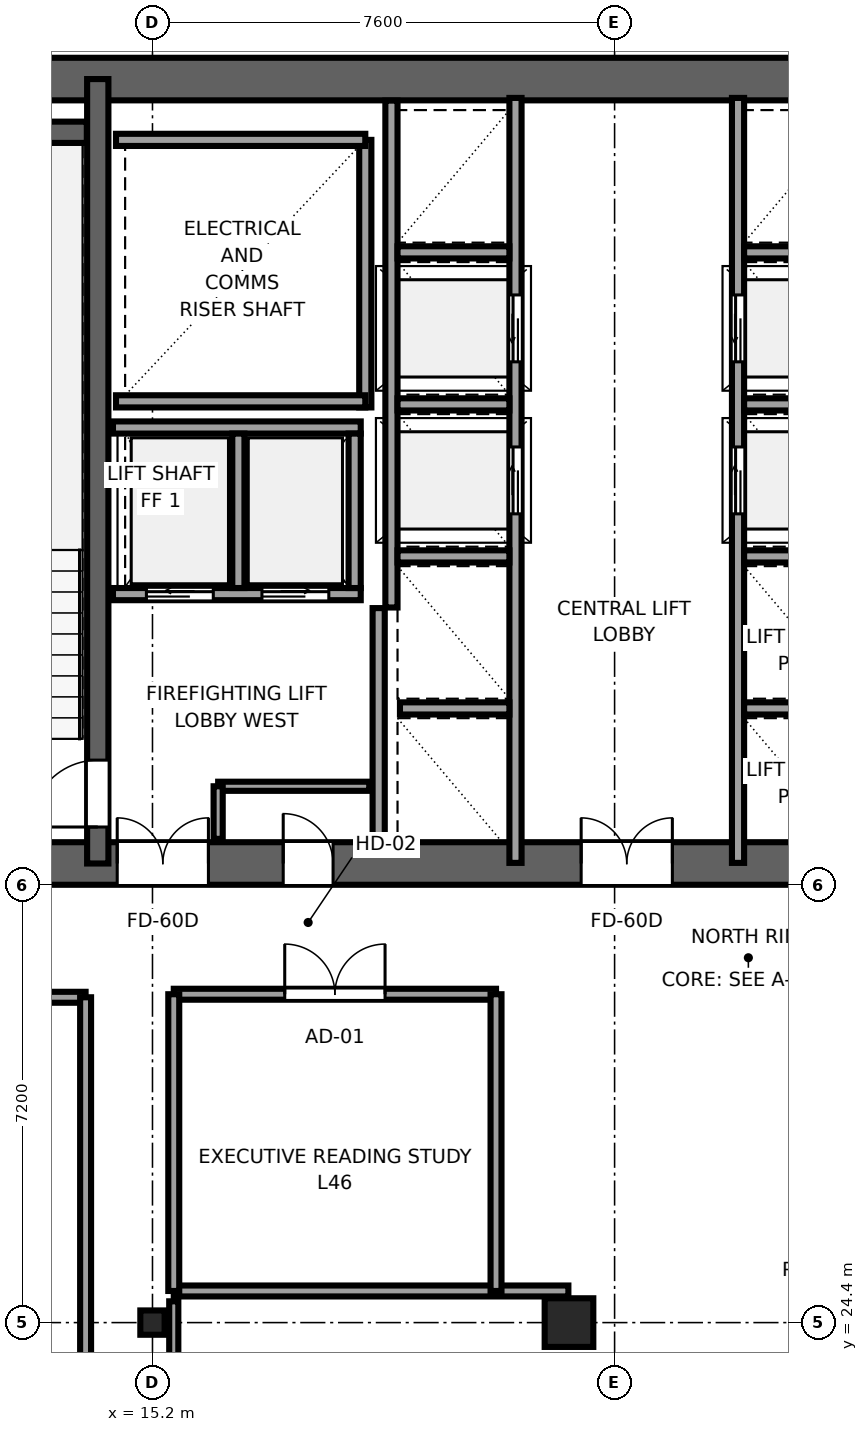
"""IFC4 building model, lengths in metres.
Left out: names, types, materials, properties, quantities, classifications, styles, units other than length and angle.
Written with IfcOpenShell. Run it as: python <this file> out.ifc"""

import sys

from ifc_helpers import new_model, si_unit, direction, frame, frame_2d, origin, origin_2d, place, context, subcontext, project, spatial, rectangle, i_section, extrude, source, transform, mapped, element, fill, save


model = new_model("IFC4")
c1 = context("Model", 3, precision=1e-05, world=origin(), true_north=direction((0.0, 1.0)))
c2 = subcontext(c1, "Body", "Model", "MODEL_VIEW")
j1 = project(units=[si_unit("LENGTHUNIT", "METRE"), si_unit("PLANEANGLEUNIT", "RADIAN")], contexts=[c1])
p1 = place(None, origin())
s1 = spatial("IfcSite", under=j1, at=p1, CompositionType="ELEMENT")
p2 = place(p1, origin())
s2 = spatial("IfcBuilding", under=s1, at=p2, CompositionType="ELEMENT")
p3 = place(p2, frame((0.0, 0.0, 175.45)))
s3 = spatial("IfcBuildingStorey", under=s2, at=p3, CompositionType="ELEMENT", Elevation=175.45)
p4 = place(p3, frame((9.8, 31.95, 0.0), z_axis=(0.0, 0.0, 1.0), x_axis=(1.0, 0.0, 0.0)))
e1 = element("IfcWall", 1, at=p4, inside=s3, PredefinedType="SHEAR", context=c2, shape_type="SweptSolid", body=[
    extrude(rectangle(XDim=26.4, YDim=0.7, at=frame_2d((13.2, 0.0))), origin(), (0.0, 0.0, 1.0), 3.55),
])
p5 = place(p4, frame((6.32, 0.0, 0.0), z_axis=(0.0, 0.0, 1.0), x_axis=(-1.0, 0.0, 0.0)))
e2 = element("IfcOpeningElement", 2, at=p5, cuts=e1, PredefinedType="OPENING", context=c2, shape_type="SweptSolid", body=[
    extrude(rectangle(XDim=1.5, YDim=2.04, at=frame_2d((0.75, 1.02))), frame((0.0, 0.36, 0.0), z_axis=(0.0, -1.0, 0.0), x_axis=(1.0, 0.0, 0.0)), (0.0, 0.0, 1.0), 0.72),
])
p6 = place(p4, frame((13.95, 0.0, 0.0), z_axis=(0.0, 0.0, 1.0), x_axis=(-1.0, 0.0, 0.0)))
e3 = element("IfcOpeningElement", 3, at=p6, cuts=e1, PredefinedType="OPENING", context=c2, shape_type="SweptSolid", body=[
    extrude(rectangle(XDim=1.5, YDim=2.04, at=frame_2d((0.75, 1.02))), frame((0.0, 0.36, 0.0), z_axis=(0.0, -1.0, 0.0), x_axis=(1.0, 0.0, 0.0)), (0.0, 0.0, 1.0), 0.72),
])
p7 = place(p4, frame((20.25, 0.0, 0.0), z_axis=(0.0, 0.0, 1.0), x_axis=(-1.0, 0.0, 0.0)))
e4 = element("IfcOpeningElement", 4, at=p7, cuts=e1, PredefinedType="OPENING", context=c2, shape_type="SweptSolid", body=[
    extrude(rectangle(XDim=1.5, YDim=2.04, at=frame_2d((0.75, 1.02))), frame((0.0, 0.36, 0.0), z_axis=(0.0, -1.0, 0.0), x_axis=(1.0, 0.0, 0.0)), (0.0, 0.0, 1.0), 0.72),
])
p8 = place(p4, frame((8.37, 0.0, 0.0), z_axis=(0.0, 0.0, 1.0), x_axis=(-1.0, 0.0, 0.0)))
e5 = element("IfcOpeningElement", 5, at=p8, cuts=e1, PredefinedType="OPENING", context=c2, shape_type="SweptSolid", body=[
    extrude(rectangle(XDim=0.82, YDim=2.01, at=frame_2d((0.41, 1.005))), frame((0.0, 0.36, 0.0), z_axis=(0.0, -1.0, 0.0), x_axis=(1.0, 0.0, 0.0)), (0.0, 0.0, 1.0), 0.72),
])
p9 = place(p3, frame((9.8, 44.85, 0.0), z_axis=(0.0, 0.0, 1.0), x_axis=(1.0, 0.0, 0.0)))
e6 = element("IfcWall", 6, at=p9, inside=s3, PredefinedType="SHEAR", context=c2, shape_type="SweptSolid", body=[
    extrude(rectangle(XDim=26.4, YDim=0.7, at=frame_2d((13.2, 0.0))), origin(), (0.0, 0.0, 1.0), 3.55),
])
p10 = place(p3, frame((14.3, 31.95, 0.0), z_axis=(0.0, 0.0, 1.0), x_axis=(0.0, 1.0, 0.0)))
e7 = element("IfcWall", 7, at=p10, inside=s3, PredefinedType="SHEAR", context=c2, shape_type="SweptSolid", body=[
    extrude(rectangle(XDim=12.9, YDim=0.35, at=frame_2d((6.45, 0.0))), origin(), (0.0, 0.0, 1.0), 3.55),
])
p11 = place(p10, frame((0.6, 0.0, 0.0)))
e8 = element("IfcOpeningElement", 8, at=p11, cuts=e7, PredefinedType="OPENING", context=c2, shape_type="SweptSolid", body=[
    extrude(rectangle(XDim=1.1, YDim=2.12, at=frame_2d((0.55, 1.06))), frame((0.0, 0.185, 0.0), z_axis=(0.0, -1.0, 0.0), x_axis=(1.0, 0.0, 0.0)), (0.0, 0.0, 1.0), 0.37),
])
p12 = place(p3, frame((10.52, 43.975, 0.0), z_axis=(0.0, 0.0, 1.0), x_axis=(1.0, 0.0, 0.0)))
e9 = element("IfcWall", 9, at=p12, inside=s3, PredefinedType="SHEAR", context=c2, shape_type="SweptSolid", body=[
    extrude(rectangle(XDim=3.6, YDim=0.35, at=frame_2d((1.8, 0.0))), origin(), (0.0, 0.0, 1.0), 3.55),
])
m1 = source(origin(), c2, "Body", "SweptSolid", [
    extrude(i_section(OverallWidth=0.4, OverallDepth=0.4, WebThickness=0.02, FlangeThickness=0.035, at=origin_2d()), origin(), (0.0, 0.0, 1.0), 3.55),
])
p13 = place(p3, frame((15.2, 24.4, 0.0), z_axis=(0.0, 0.0, 1.0), x_axis=(1.0, 0.0, 0.0)))
e10 = element("IfcColumn", 10, at=p13, inside=s3, PredefinedType="COLUMN", context=c2, shape_type="MappedRepresentation", body=[
    mapped(m1, transform((0.0, 0.0, 0.0), x_axis=(1.0, 0.0, 0.0), y_axis=(0.0, 1.0, 0.0), z_axis=(0.0, 0.0, 1.0), scale=1.0)),
])
m2 = source(origin(), c2, "Body", "SweptSolid", [
    extrude(rectangle(XDim=0.8, YDim=0.8, at=origin_2d()), origin(), (0.0, 0.0, 1.0), 3.55),
])
p14 = place(p3, frame((22.05, 24.4, 0.0), z_axis=(0.0, 0.0, 1.0), x_axis=(1.0, 0.0, 0.0)))
e11 = element("IfcColumn", 11, at=p14, inside=s3, PredefinedType="COLUMN", context=c2, shape_type="MappedRepresentation", body=[
    mapped(m2, transform((0.0, 0.0, 0.0), x_axis=(1.0, 0.0, 0.0), y_axis=(0.0, 1.0, 0.0), z_axis=(0.0, 0.0, 1.0), scale=1.0)),
])
p15 = place(p3, frame((18.7, 39.45, 0.0), z_axis=(0.0, 0.0, 1.0), x_axis=(0.0, 1.0, 0.0)))
e12 = element("IfcWall", 12, at=p15, inside=s3, PredefinedType="SOLIDWALL", context=c2, shape_type="SweptSolid", body=[
    extrude(rectangle(XDim=4.4, YDim=0.2, at=frame_2d((2.2, 0.0))), origin(), (0.0, 0.0, 1.0), 3.37),
])
for number, where, z_axis, x_axis in (
    (13, (14.6, 39.55, 0.0), (0.0, 0.0, 1.0), (1.0, 0.0, 0.0)),
    (14, (14.6, 43.85, 0.0), (0.0, 0.0, 1.0), (1.0, 0.0, 0.0)),
):
    element("IfcWall", number, at=place(p3, frame(where, z_axis=z_axis, x_axis=x_axis)), inside=s3, PredefinedType="SOLIDWALL", context=c2, shape_type="SweptSolid", body=[
        extrude(rectangle(XDim=4.1, YDim=0.2, at=frame_2d((2.05, 0.0))), origin(), (0.0, 0.0, 1.0), 3.37),
    ])
p16 = place(p3, frame((18.92, 32.304, 0.0), z_axis=(0.0, 0.0, 1.0), x_axis=(0.0, 1.0, 0.0)))
e15 = element("IfcWall", 15, at=p16, inside=s3, PredefinedType="SOLIDWALL", context=c2, shape_type="SweptSolid", body=[
    extrude(rectangle(XDim=3.846, YDim=0.2, at=frame_2d((1.923, 0.0))), origin(), (0.0, 0.0, 1.0), 3.37),
])
p17 = place(p3, frame((21.17, 31.96, 0.0), z_axis=(0.0, 0.0, 1.0), x_axis=(0.0, 1.0, 0.0)))
e16 = element("IfcWall", 16, at=p17, inside=s3, PredefinedType="SOLIDWALL", context=c2, shape_type="SweptSolid", body=[
    extrude(rectangle(XDim=12.58, YDim=0.2, at=frame_2d((6.29, 0.0))), origin(), (0.0, 0.0, 1.0), 3.37),
])
p18 = place(p17, frame((5.74, 0.0, 0.0)))
e17 = element("IfcOpeningElement", 17, at=p18, cuts=e16, PredefinedType="OPENING", context=c2, shape_type="SweptSolid", body=[
    extrude(rectangle(XDim=1.1, YDim=2.12, at=frame_2d((0.55, 1.06))), frame((0.0, 0.11, 0.0), z_axis=(0.0, -1.0, 0.0), x_axis=(1.0, 0.0, 0.0)), (0.0, 0.0, 1.0), 0.22),
])
p19 = place(p17, frame((8.24, 0.0, 0.0)))
e18 = element("IfcOpeningElement", 18, at=p19, cuts=e16, PredefinedType="OPENING", context=c2, shape_type="SweptSolid", body=[
    extrude(rectangle(XDim=1.1, YDim=2.12, at=frame_2d((0.55, 1.06))), frame((0.0, 0.11, 0.0), z_axis=(0.0, -1.0, 0.0), x_axis=(1.0, 0.0, 0.0)), (0.0, 0.0, 1.0), 0.22),
])
p20 = place(p3, frame((19.13, 36.16, 0.0), z_axis=(0.0, 0.0, 1.0), x_axis=(0.0, 1.0, 0.0)))
e19 = element("IfcWall", 19, at=p20, inside=s3, PredefinedType="SOLIDWALL", context=c2, shape_type="SweptSolid", body=[
    extrude(rectangle(XDim=8.336, YDim=0.2, at=frame_2d((4.168, 0.0))), origin(), (0.0, 0.0, 1.0), 3.37),
])
p21 = place(p3, frame((19.27, 34.5, 0.0), z_axis=(0.0, 0.0, 1.0), x_axis=(1.0, 0.0, 0.0)))
e20 = element("IfcWall", 20, at=p21, inside=s3, PredefinedType="SOLIDWALL", context=c2, shape_type="SweptSolid", body=[
    extrude(rectangle(XDim=1.8, YDim=0.2, at=frame_2d((0.9, 0.0))), origin(), (0.0, 0.0, 1.0), 3.37),
])
for number, where, z_axis, x_axis in (
    (21, (19.23, 37.0, 0.0), (0.0, 0.0, 1.0), (1.0, 0.0, 0.0)),
    (22, (19.23, 39.5, 0.0), (0.0, 0.0, 1.0), (1.0, 0.0, 0.0)),
    (23, (19.23, 42.0, 0.0), (0.0, 0.0, 1.0), (1.0, 0.0, 0.0)),
):
    element("IfcWall", number, at=place(p3, frame(where, z_axis=z_axis, x_axis=x_axis)), inside=s3, PredefinedType="SOLIDWALL", context=c2, shape_type="SweptSolid", body=[
        extrude(rectangle(XDim=1.84, YDim=0.2, at=frame_2d((0.92, 0.0))), origin(), (0.0, 0.0, 1.0), 3.37),
    ])
p22 = place(p3, frame((14.55, 36.38, 0.0), z_axis=(0.0, 0.0, 1.0), x_axis=(1.0, 0.0, 0.0)))
e24 = element("IfcWall", 24, at=p22, inside=s3, PredefinedType="SOLIDWALL", context=c2, shape_type="SweptSolid", body=[
    extrude(rectangle(XDim=4.075, YDim=0.2, at=frame_2d((2.038, 0.0))), origin(), (0.0, 0.0, 1.0), 3.37),
])
p23 = place(p22, frame((0.55, 0.0, 0.0)))
e25 = element("IfcOpeningElement", 25, at=p23, cuts=e24, PredefinedType="OPENING", context=c2, shape_type="SweptSolid", body=[
    extrude(rectangle(XDim=1.1, YDim=2.12, at=frame_2d((0.55, 1.06))), frame((0.0, 0.11, 0.0), z_axis=(0.0, -1.0, 0.0), x_axis=(1.0, 0.0, 0.0)), (0.0, 0.0, 1.0), 0.22),
])
p24 = place(p22, frame((2.45, 0.0, 0.0)))
e26 = element("IfcOpeningElement", 26, at=p24, cuts=e24, PredefinedType="OPENING", context=c2, shape_type="SweptSolid", body=[
    extrude(rectangle(XDim=1.1, YDim=2.12, at=frame_2d((0.55, 1.06))), frame((0.0, 0.11, 0.0), z_axis=(0.0, -1.0, 0.0), x_axis=(1.0, 0.0, 0.0)), (0.0, 0.0, 1.0), 0.22),
])
p25 = place(p3, frame((14.55, 39.12, 0.0), z_axis=(0.0, 0.0, 1.0), x_axis=(1.0, 0.0, 0.0)))
e27 = element("IfcWall", 27, at=p25, inside=s3, PredefinedType="SOLIDWALL", context=c2, shape_type="SweptSolid", body=[
    extrude(rectangle(XDim=4.075, YDim=0.2, at=frame_2d((2.038, 0.0))), origin(), (0.0, 0.0, 1.0), 3.37),
])
for number, where, z_axis, x_axis in (
    (28, (18.525, 36.48, 0.0), (0.0, 0.0, 1.0), (0.0, 1.0, 0.0)),
    (29, (16.613, 36.48, 0.0), (0.0, 0.0, 1.0), (0.0, 1.0, 0.0)),
):
    element("IfcWall", number, at=place(p3, frame(where, z_axis=z_axis, x_axis=x_axis)), inside=s3, PredefinedType="SOLIDWALL", context=c2, shape_type="SweptSolid", body=[
        extrude(rectangle(XDim=2.54, YDim=0.2, at=frame_2d((1.27, 0.0))), origin(), (0.0, 0.0, 1.0), 3.37),
    ])
p26 = place(p3, frame((24.83, 31.96, 0.0), z_axis=(0.0, 0.0, 1.0), x_axis=(0.0, 1.0, 0.0)))
e30 = element("IfcWall", 30, at=p26, inside=s3, PredefinedType="SOLIDWALL", context=c2, shape_type="SweptSolid", body=[
    extrude(rectangle(XDim=12.58, YDim=0.2, at=frame_2d((6.29, 0.0))), origin(), (0.0, 0.0, 1.0), 3.37),
])
p27 = place(p26, frame((5.74, 0.0, 0.0)))
e31 = element("IfcOpeningElement", 31, at=p27, cuts=e30, PredefinedType="OPENING", context=c2, shape_type="SweptSolid", body=[
    extrude(rectangle(XDim=1.1, YDim=2.12, at=frame_2d((0.55, 1.06))), frame((0.0, 0.11, 0.0), z_axis=(0.0, -1.0, 0.0), x_axis=(1.0, 0.0, 0.0)), (0.0, 0.0, 1.0), 0.22),
])
p28 = place(p26, frame((8.24, 0.0, 0.0)))
e32 = element("IfcOpeningElement", 32, at=p28, cuts=e30, PredefinedType="OPENING", context=c2, shape_type="SweptSolid", body=[
    extrude(rectangle(XDim=1.1, YDim=2.12, at=frame_2d((0.55, 1.06))), frame((0.0, 0.11, 0.0), z_axis=(0.0, -1.0, 0.0), x_axis=(1.0, 0.0, 0.0)), (0.0, 0.0, 1.0), 0.22),
])
p29 = place(p3, frame((24.93, 34.5, 0.0), z_axis=(0.0, 0.0, 1.0), x_axis=(1.0, 0.0, 0.0)))
e33 = element("IfcWall", 33, at=p29, inside=s3, PredefinedType="SOLIDWALL", context=c2, shape_type="SweptSolid", body=[
    extrude(rectangle(XDim=1.8, YDim=0.2, at=frame_2d((0.9, 0.0))), origin(), (0.0, 0.0, 1.0), 3.37),
])
for number, where, z_axis, x_axis in (
    (34, (24.93, 37.0, 0.0), (0.0, 0.0, 1.0), (1.0, 0.0, 0.0)),
    (35, (24.93, 39.5, 0.0), (0.0, 0.0, 1.0), (1.0, 0.0, 0.0)),
    (36, (24.93, 42.0, 0.0), (0.0, 0.0, 1.0), (1.0, 0.0, 0.0)),
):
    element("IfcWall", number, at=place(p3, frame(where, z_axis=z_axis, x_axis=x_axis)), inside=s3, PredefinedType="SOLIDWALL", context=c2, shape_type="SweptSolid", body=[
        extrude(rectangle(XDim=1.84, YDim=0.2, at=frame_2d((0.92, 0.0))), origin(), (0.0, 0.0, 1.0), 3.37),
    ])
p30 = place(p3, frame((16.28, 33.22, 0.0), z_axis=(0.0, 0.0, 1.0), x_axis=(1.0, 0.0, 0.0)))
e37 = element("IfcWall", 37, at=p30, inside=s3, PredefinedType="PARTITIONING", context=c2, shape_type="SweptSolid", body=[
    extrude(rectangle(XDim=2.485, YDim=0.15, at=frame_2d((1.242, 0.0))), origin(), (0.0, 0.0, 1.0), 3.37),
])
p31 = place(p3, frame((16.28, 32.355, 0.0), z_axis=(0.0, 0.0, 1.0), x_axis=(0.0, 1.0, 0.0)))
e38 = element("IfcWall", 38, at=p31, inside=s3, PredefinedType="PARTITIONING", context=c2, shape_type="SweptSolid", body=[
    extrude(rectangle(XDim=0.865, YDim=0.15, at=frame_2d((0.433, 0.0))), origin(), (0.0, 0.0, 1.0), 3.37),
])
p32 = place(p3, frame((9.88, 29.75, 0.0), z_axis=(0.0, 0.0, 1.0), x_axis=(1.0, 0.0, 0.0)))
e39 = element("IfcWall", 39, at=p32, inside=s3, PredefinedType="PARTITIONING", context=c2, shape_type="SweptSolid", body=[
    extrude(rectangle(XDim=4.22, YDim=0.18, at=frame_2d((2.11, 0.0))), origin(), (0.0, 0.0, 1.0), 3.37),
])
p33 = place(p3, frame((14.1, 20.7, 0.0), z_axis=(0.0, 0.0, 1.0), x_axis=(0.0, 1.0, 0.0)))
e40 = element("IfcWall", 40, at=p33, inside=s3, PredefinedType="PARTITIONING", context=c2, shape_type="SweptSolid", body=[
    extrude(rectangle(XDim=9.05, YDim=0.18, at=frame_2d((4.525, 0.0))), origin(), (0.0, 0.0, 1.0), 3.37),
])
p34 = place(p3, frame((15.55, 24.92, 0.0), z_axis=(0.0, 0.0, 1.0), x_axis=(1.0, 0.0, 0.0)))
e41 = element("IfcWall", 41, at=p34, inside=s3, PredefinedType="PARTITIONING", context=c2, shape_type="SweptSolid", body=[
    extrude(rectangle(XDim=6.49, YDim=0.18, at=frame_2d((3.245, 0.0))), origin(), (0.0, 0.0, 1.0), 3.37),
])
p35 = place(p3, frame((15.55, 29.8, 0.0), z_axis=(0.0, 0.0, 1.0), x_axis=(1.0, 0.0, 0.0)))
e42 = element("IfcWall", 42, at=p35, inside=s3, PredefinedType="PARTITIONING", context=c2, shape_type="SweptSolid", body=[
    extrude(rectangle(XDim=5.3, YDim=0.18, at=frame_2d((2.65, 0.0))), origin(), (0.0, 0.0, 1.0), 3.37),
])
p36 = place(p35, frame((1.825, 0.0, 0.0)))
e43 = element("IfcOpeningElement", 43, at=p36, cuts=e42, PredefinedType="OPENING", context=c2, shape_type="SweptSolid", body=[
    extrude(rectangle(XDim=1.65, YDim=2.15, at=frame_2d((0.825, 1.075))), frame((0.0, 0.1, 0.0), z_axis=(0.0, -1.0, 0.0), x_axis=(1.0, 0.0, 0.0)), (0.0, 0.0, 1.0), 0.2),
])
for number, where, z_axis, x_axis in (
    (44, (15.55, 24.92, 0.0), (0.0, 0.0, 1.0), (0.0, 1.0, 0.0)),
    (45, (20.85, 24.92, 0.0), (0.0, 0.0, 1.0), (0.0, 1.0, 0.0)),
):
    element("IfcWall", number, at=place(p3, frame(where, z_axis=z_axis, x_axis=x_axis)), inside=s3, PredefinedType="PARTITIONING", context=c2, shape_type="SweptSolid", body=[
        extrude(rectangle(XDim=4.88, YDim=0.18, at=frame_2d((2.44, 0.0))), origin(), (0.0, 0.0, 1.0), 3.37),
    ])
p37 = place(p3, frame((15.55, 20.67, 0.0), z_axis=(0.0, 0.0, 1.0), x_axis=(0.0, 1.0, 0.0)))
e46 = element("IfcWall", 46, at=p37, inside=s3, PredefinedType="PARTITIONING", context=c2, shape_type="SweptSolid", body=[
    extrude(rectangle(XDim=4.08, YDim=0.15, at=frame_2d((2.04, 0.0))), origin(), (0.0, 0.0, 1.0), 3.37),
])
m3 = source(origin(), c2, "Body", "SweptSolid", [
    extrude(rectangle(XDim=1.1, YDim=2.12, at=frame_2d((0.55, 1.06))), frame((0.0, 0.025, 0.0), z_axis=(0.0, -1.0, 0.0), x_axis=(1.0, 0.0, 0.0)), (0.0, 0.0, 1.0), 0.05),
])
p38 = place(p11, origin())
e47 = element("IfcDoor", 47, at=p38, inside=s3, OperationType="SINGLE_SWING_LEFT", PredefinedType="DOOR", context=c2, shape_type="MappedRepresentation", body=[
    mapped(m3, transform((0.0, 0.0, 0.0), x_axis=(1.0, 0.0, 0.0), y_axis=(0.0, 1.0, 0.0), z_axis=(0.0, 0.0, 1.0), scale=1.0)),
])
fill(e8, e47)
m4 = source(origin(), c2, "Body", "SweptSolid", [
    extrude(rectangle(XDim=1.5, YDim=2.04, at=frame_2d((0.75, 1.02))), frame((0.0, 0.025, 0.0), z_axis=(0.0, -1.0, 0.0), x_axis=(1.0, 0.0, 0.0)), (0.0, 0.0, 1.0), 0.05),
])
p39 = place(p5, origin())
e48 = element("IfcDoor", 48, at=p39, inside=s3, OperationType="DOUBLE_DOOR_SINGLE_SWING", PredefinedType="DOOR", context=c2, shape_type="MappedRepresentation", body=[
    mapped(m4, transform((0.0, 0.0, 0.0), x_axis=(1.0, 0.0, 0.0), y_axis=(0.0, 1.0, 0.0), z_axis=(0.0, 0.0, 1.0), scale=1.0)),
])
fill(e2, e48)
p40 = place(p6, origin())
e49 = element("IfcDoor", 49, at=p40, inside=s3, OperationType="DOUBLE_DOOR_SINGLE_SWING", PredefinedType="DOOR", context=c2, shape_type="MappedRepresentation", body=[
    mapped(m4, transform((0.0, 0.0, 0.0), x_axis=(1.0, 0.0, 0.0), y_axis=(0.0, 1.0, 0.0), z_axis=(0.0, 0.0, 1.0), scale=1.0)),
])
fill(e3, e49)
m5 = source(origin(), c2, "Body", "SweptSolid", [
    extrude(rectangle(XDim=0.82, YDim=2.01, at=frame_2d((0.41, 1.005))), frame((0.0, 0.025, 0.0), z_axis=(0.0, -1.0, 0.0), x_axis=(1.0, 0.0, 0.0)), (0.0, 0.0, 1.0), 0.05),
])
p41 = place(p8, origin())
e50 = element("IfcDoor", 50, at=p41, inside=s3, OperationType="SINGLE_SWING_LEFT", PredefinedType="DOOR", context=c2, shape_type="MappedRepresentation", body=[
    mapped(m5, transform((0.0, 0.0, 0.0), x_axis=(1.0, 0.0, 0.0), y_axis=(0.0, 1.0, 0.0), z_axis=(0.0, 0.0, 1.0), scale=1.0)),
])
fill(e5, e50)
m6 = source(origin(), c2, "Body", "SweptSolid", [
    extrude(rectangle(XDim=1.1, YDim=2.12, at=frame_2d((0.55, 1.06))), frame((0.0, 0.025, 0.0), z_axis=(0.0, -1.0, 0.0), x_axis=(1.0, 0.0, 0.0)), (0.0, 0.0, 1.0), 0.05),
])
p42 = place(p18, origin())
e51 = element("IfcDoor", 51, at=p42, inside=s3, OperationType="SLIDING_TO_RIGHT", PredefinedType="DOOR", context=c2, shape_type="MappedRepresentation", body=[
    mapped(m6, transform((0.0, 0.0, 0.0), x_axis=(1.0, 0.0, 0.0), y_axis=(0.0, 1.0, 0.0), z_axis=(0.0, 0.0, 1.0), scale=1.0)),
])
fill(e17, e51)
p43 = place(p19, origin())
e52 = element("IfcDoor", 52, at=p43, inside=s3, OperationType="SLIDING_TO_LEFT", PredefinedType="DOOR", context=c2, shape_type="MappedRepresentation", body=[
    mapped(m6, transform((0.0, 0.0, 0.0), x_axis=(1.0, 0.0, 0.0), y_axis=(0.0, 1.0, 0.0), z_axis=(0.0, 0.0, 1.0), scale=1.0)),
])
fill(e18, e52)
p44 = place(p23, origin())
e53 = element("IfcDoor", 53, at=p44, inside=s3, OperationType="SLIDING_TO_LEFT", PredefinedType="DOOR", context=c2, shape_type="MappedRepresentation", body=[
    mapped(m6, transform((0.0, 0.0, 0.0), x_axis=(1.0, 0.0, 0.0), y_axis=(0.0, 1.0, 0.0), z_axis=(0.0, 0.0, 1.0), scale=1.0)),
])
fill(e25, e53)
p45 = place(p24, origin())
e54 = element("IfcDoor", 54, at=p45, inside=s3, OperationType="SLIDING_TO_RIGHT", PredefinedType="DOOR", context=c2, shape_type="MappedRepresentation", body=[
    mapped(m6, transform((0.0, 0.0, 0.0), x_axis=(1.0, 0.0, 0.0), y_axis=(0.0, 1.0, 0.0), z_axis=(0.0, 0.0, 1.0), scale=1.0)),
])
fill(e26, e54)
p46 = place(p27, origin())
e55 = element("IfcDoor", 55, at=p46, inside=s3, OperationType="SLIDING_TO_RIGHT", PredefinedType="DOOR", context=c2, shape_type="MappedRepresentation", body=[
    mapped(m6, transform((0.0, 0.0, 0.0), x_axis=(1.0, 0.0, 0.0), y_axis=(0.0, 1.0, 0.0), z_axis=(0.0, 0.0, 1.0), scale=1.0)),
])
fill(e31, e55)
p47 = place(p28, origin())
e56 = element("IfcDoor", 56, at=p47, inside=s3, OperationType="SLIDING_TO_LEFT", PredefinedType="DOOR", context=c2, shape_type="MappedRepresentation", body=[
    mapped(m6, transform((0.0, 0.0, 0.0), x_axis=(1.0, 0.0, 0.0), y_axis=(0.0, 1.0, 0.0), z_axis=(0.0, 0.0, 1.0), scale=1.0)),
])
fill(e32, e56)
m7 = source(origin(), c2, "Body", "SweptSolid", [
    extrude(rectangle(XDim=1.65, YDim=2.15, at=frame_2d((0.825, 1.075))), frame((0.0, 0.025, 0.0), z_axis=(0.0, -1.0, 0.0), x_axis=(1.0, 0.0, 0.0)), (0.0, 0.0, 1.0), 0.05),
])
p48 = place(p36, origin())
e57 = element("IfcDoor", 57, at=p48, inside=s3, OperationType="DOUBLE_DOOR_SINGLE_SWING", PredefinedType="DOOR", context=c2, shape_type="MappedRepresentation", body=[
    mapped(m7, transform((0.0, 0.0, 0.0), x_axis=(1.0, 0.0, 0.0), y_axis=(0.0, 1.0, 0.0), z_axis=(0.0, 0.0, 1.0), scale=1.0)),
])
fill(e43, e57)
save(model, sys.argv[1])
